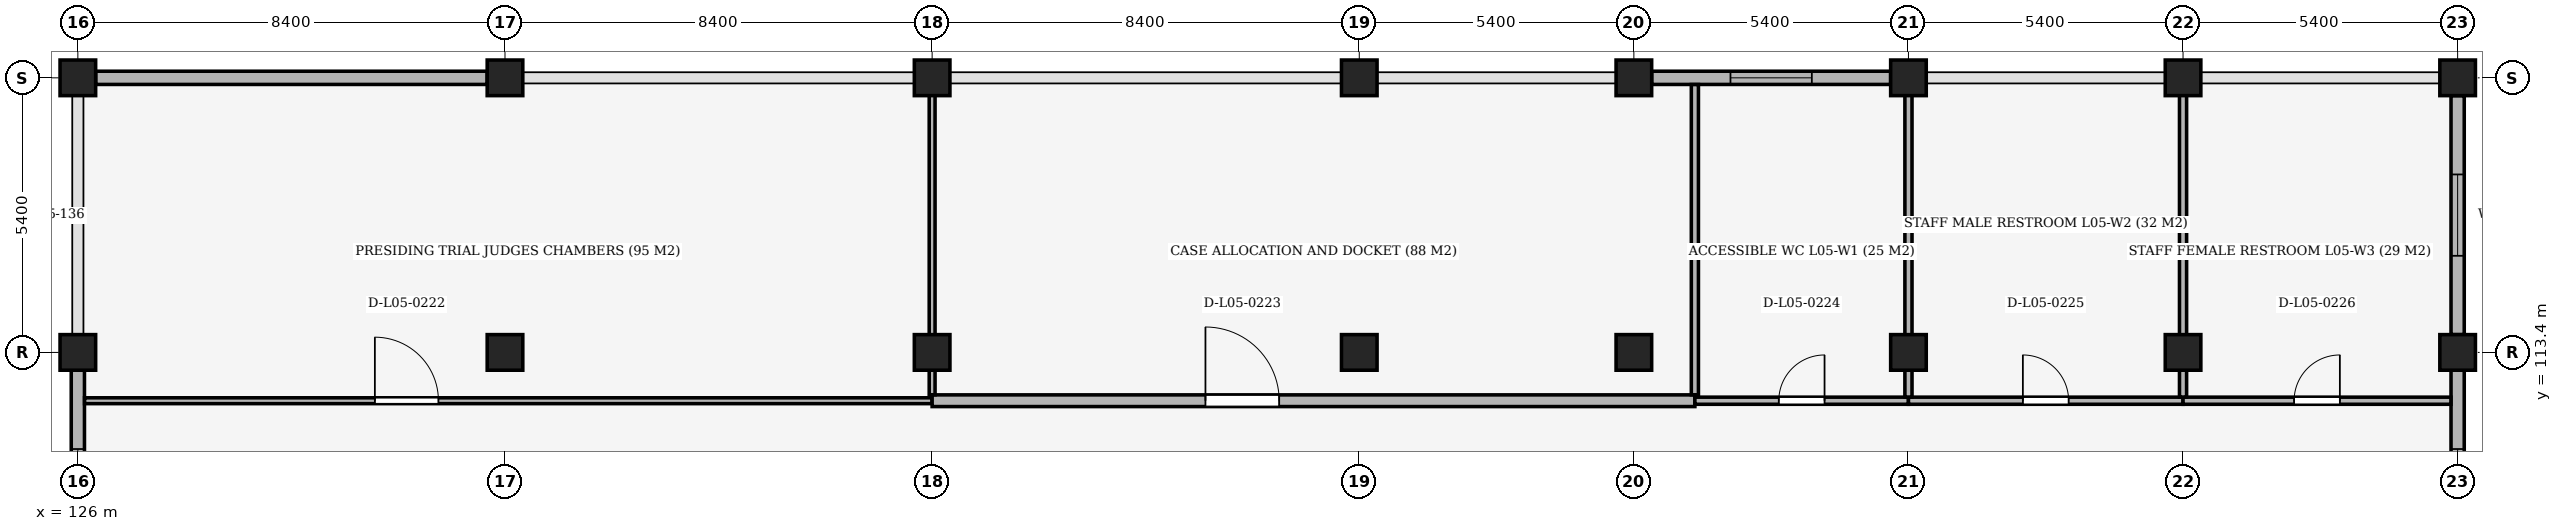
"""IFC4 building model, lengths in metres.
Left out: names, types, materials, properties, quantities, classifications, styles, units other than length and angle.
Written with IfcOpenShell. Run it as: python <this file> out.ifc"""

import sys

from ifc_helpers import new_model, si_unit, direction, frame, frame_2d, origin, origin_2d, place, context, subcontext, project, spatial, rectangle, extrude, element, fill, save


model = new_model("IFC4")
c1 = context("Model", 3, precision=1e-05, world=origin(), true_north=direction((0.0, 1.0)))
c2 = subcontext(c1, "Body", "Model", "MODEL_VIEW")
j1 = project(units=[si_unit("LENGTHUNIT", "METRE"), si_unit("PLANEANGLEUNIT", "RADIAN")], contexts=[c1])
p1 = place(None, origin())
s1 = spatial("IfcSite", under=j1, at=p1, CompositionType="ELEMENT")
p2 = place(p1, origin())
s2 = spatial("IfcBuilding", under=s1, at=p2, CompositionType="ELEMENT")
p3 = place(p2, frame((0.0, 0.0, 25.2)))
s3 = spatial("IfcBuildingStorey", under=s2, at=p3, CompositionType="ELEMENT", Elevation=25.2)
for number, where, z_axis, x_axis in (
    (1, (126.0, 113.4, 0.0), (0.0, 0.0, 1.0), (1.0, 0.0, 0.0)),
    (2, (126.0, 118.8, 0.0), (0.0, 0.0, 1.0), (1.0, 0.0, 0.0)),
    (3, (134.4, 113.4, 0.0), (0.0, 0.0, 1.0), (1.0, 0.0, 0.0)),
    (4, (134.4, 118.8, 0.0), (0.0, 0.0, 1.0), (1.0, 0.0, 0.0)),
    (5, (142.8, 113.4, 0.0), (0.0, 0.0, 1.0), (1.0, 0.0, 0.0)),
    (6, (142.8, 118.8, 0.0), (0.0, 0.0, 1.0), (1.0, 0.0, 0.0)),
    (7, (151.2, 113.4, 0.0), (0.0, 0.0, 1.0), (1.0, 0.0, 0.0)),
    (8, (151.2, 118.8, 0.0), (0.0, 0.0, 1.0), (1.0, 0.0, 0.0)),
    (9, (156.6, 113.4, 0.0), (0.0, 0.0, 1.0), (1.0, 0.0, 0.0)),
    (10, (156.6, 118.8, 0.0), (0.0, 0.0, 1.0), (1.0, 0.0, 0.0)),
    (11, (162.0, 113.4, 0.0), (0.0, 0.0, 1.0), (1.0, 0.0, 0.0)),
    (12, (162.0, 118.8, 0.0), (0.0, 0.0, 1.0), (1.0, 0.0, 0.0)),
    (13, (167.4, 113.4, 0.0), (0.0, 0.0, 1.0), (1.0, 0.0, 0.0)),
    (14, (167.4, 118.8, 0.0), (0.0, 0.0, 1.0), (1.0, 0.0, 0.0)),
    (15, (172.8, 113.4, 0.0), (0.0, 0.0, 1.0), (1.0, 0.0, 0.0)),
    (16, (172.8, 118.8, 0.0), (0.0, 0.0, 1.0), (1.0, 0.0, 0.0)),
):
    element("IfcColumn", number, at=place(p3, frame(where, z_axis=z_axis, x_axis=x_axis)), inside=s3, PredefinedType="COLUMN", context=c2, shape_type="SweptSolid", body=[
        extrude(rectangle(XDim=0.7, YDim=0.7, at=origin_2d()), origin(), (0.0, 0.0, 1.0), 4.2),
    ])
p4 = place(p3, frame((126.0, 108.35, 0.0), z_axis=(0.0, 0.0, 1.0), x_axis=(0.0, 1.0, 0.0)))
e17 = element("IfcWall", 17, at=p4, inside=s3, PredefinedType="SOLIDWALL", context=c2, shape_type="SweptSolid", body=[
    extrude(rectangle(XDim=4.7, YDim=0.26, at=frame_2d((2.35, 0.0))), origin(), (0.0, 0.0, 1.0), 3.4),
])
p5 = place(p4, frame((1.55, 0.0, 1.05)))
e18 = element("IfcOpeningElement", 18, at=p5, cuts=e17, PredefinedType="OPENING", context=c2, shape_type="SweptSolid", body=[
    extrude(rectangle(XDim=1.6, YDim=1.8, at=frame_2d((0.8, 0.9))), frame((0.0, 0.145, 0.0), z_axis=(0.0, -1.0, 0.0), x_axis=(1.0, 0.0, 0.0)), (0.0, 0.0, 1.0), 0.29),
])
p6 = place(p3, frame((126.35, 118.8, 0.0), z_axis=(0.0, 0.0, 1.0), x_axis=(1.0, 0.0, 0.0)))
e19 = element("IfcWall", 19, at=p6, inside=s3, PredefinedType="SOLIDWALL", context=c2, shape_type="SweptSolid", body=[
    extrude(rectangle(XDim=7.7, YDim=0.26, at=frame_2d((3.85, 0.0))), origin(), (0.0, 0.0, 1.0), 3.25),
])
p7 = place(p3, frame((156.95, 118.8, 0.0), z_axis=(0.0, 0.0, 1.0), x_axis=(1.0, 0.0, 0.0)))
e20 = element("IfcWall", 20, at=p7, inside=s3, PredefinedType="SOLIDWALL", context=c2, shape_type="SweptSolid", body=[
    extrude(rectangle(XDim=4.7, YDim=0.26, at=frame_2d((2.35, 0.0))), origin(), (0.0, 0.0, 1.0), 3.35),
])
p8 = place(p7, frame((1.55, 0.0, 1.05)))
e21 = element("IfcOpeningElement", 21, at=p8, cuts=e20, PredefinedType="OPENING", context=c2, shape_type="SweptSolid", body=[
    extrude(rectangle(XDim=1.6, YDim=1.8, at=frame_2d((0.8, 0.9))), frame((0.0, 0.145, 0.0), z_axis=(0.0, -1.0, 0.0), x_axis=(1.0, 0.0, 0.0)), (0.0, 0.0, 1.0), 0.29),
])
p9 = place(p3, frame((172.8, 118.45, 0.0), z_axis=(0.0, 0.0, 1.0), x_axis=(0.0, -1.0, 0.0)))
e22 = element("IfcWall", 22, at=p9, inside=s3, PredefinedType="SOLIDWALL", context=c2, shape_type="SweptSolid", body=[
    extrude(rectangle(XDim=4.7, YDim=0.26, at=frame_2d((2.35, 0.0))), origin(), (0.0, 0.0, 1.0), 3.4),
])
p10 = place(p9, frame((1.55, 0.0, 1.05)))
e23 = element("IfcOpeningElement", 23, at=p10, cuts=e22, PredefinedType="OPENING", context=c2, shape_type="SweptSolid", body=[
    extrude(rectangle(XDim=1.6, YDim=1.8, at=frame_2d((0.8, 0.9))), frame((0.0, 0.145, 0.0), z_axis=(0.0, -1.0, 0.0), x_axis=(1.0, 0.0, 0.0)), (0.0, 0.0, 1.0), 0.29),
])
p11 = place(p3, frame((172.8, 113.05, 0.0), z_axis=(0.0, 0.0, 1.0), x_axis=(0.0, -1.0, 0.0)))
e24 = element("IfcWall", 24, at=p11, inside=s3, PredefinedType="SOLIDWALL", context=c2, shape_type="SweptSolid", body=[
    extrude(rectangle(XDim=4.7, YDim=0.26, at=frame_2d((2.35, 0.0))), origin(), (0.0, 0.0, 1.0), 3.4),
])
p12 = place(p11, frame((1.55, 0.0, 1.05)))
e25 = element("IfcOpeningElement", 25, at=p12, cuts=e24, PredefinedType="OPENING", context=c2, shape_type="SweptSolid", body=[
    extrude(rectangle(XDim=1.6, YDim=1.8, at=frame_2d((0.8, 0.9))), frame((0.0, 0.145, 0.0), z_axis=(0.0, -1.0, 0.0), x_axis=(1.0, 0.0, 0.0)), (0.0, 0.0, 1.0), 0.29),
])
p13 = place(p3, frame((126.132, 112.45, 0.0), z_axis=(0.0, 0.0, 1.0), x_axis=(1.0, 0.0, 0.0)))
e26 = element("IfcWall", 26, at=p13, inside=s3, PredefinedType="PARTITIONING", context=c2, shape_type="SweptSolid", body=[
    extrude(rectangle(XDim=16.668, YDim=0.115, at=frame_2d((8.334, 0.0))), origin(), (0.0, 0.0, 1.0), 3.4),
])
p14 = place(p13, frame((5.709, 0.0, 0.0)))
e27 = element("IfcOpeningElement", 27, at=p14, cuts=e26, PredefinedType="OPENING", context=c2, shape_type="SweptSolid", body=[
    extrude(rectangle(XDim=1.25, YDim=2.2, at=frame_2d((0.625, 1.1))), frame((0.0, 0.072, 0.0), z_axis=(0.0, -1.0, 0.0), x_axis=(1.0, 0.0, 0.0)), (0.0, 0.0, 1.0), 0.145),
])
p15 = place(p3, frame((142.8, 112.45, 0.0), z_axis=(0.0, 0.0, 1.0), x_axis=(1.0, 0.0, 0.0)))
e28 = element("IfcWall", 28, at=p15, inside=s3, PredefinedType="SOLIDWALL", context=c2, shape_type="SweptSolid", body=[
    extrude(rectangle(XDim=15.0, YDim=0.23, at=frame_2d((7.5, 0.0))), origin(), (0.0, 0.0, 1.0), 3.4),
])
p16 = place(p15, frame((5.375, 0.0, 0.0)))
e29 = element("IfcOpeningElement", 29, at=p16, cuts=e28, PredefinedType="OPENING", context=c2, shape_type="SweptSolid", body=[
    extrude(rectangle(XDim=1.45, YDim=2.25, at=frame_2d((0.725, 1.125))), frame((0.0, 0.13, 0.0), z_axis=(0.0, -1.0, 0.0), x_axis=(1.0, 0.0, 0.0)), (0.0, 0.0, 1.0), 0.26),
])
p17 = place(p3, frame((157.8, 112.45, 0.0), z_axis=(0.0, 0.0, 1.0), x_axis=(1.0, 0.0, 0.0)))
e30 = element("IfcWall", 30, at=p17, inside=s3, PredefinedType="PARTITIONING", context=c2, shape_type="SweptSolid", body=[
    extrude(rectangle(XDim=4.2, YDim=0.14, at=frame_2d((2.1, 0.0))), origin(), (0.0, 0.0, 1.0), 3.4),
])
p18 = place(p17, frame((1.65, 0.0, 0.0)))
e31 = element("IfcOpeningElement", 31, at=p18, cuts=e30, PredefinedType="OPENING", context=c2, shape_type="SweptSolid", body=[
    extrude(rectangle(XDim=0.9, YDim=2.1, at=frame_2d((0.45, 1.05))), frame((0.0, 0.085, 0.0), z_axis=(0.0, -1.0, 0.0), x_axis=(1.0, 0.0, 0.0)), (0.0, 0.0, 1.0), 0.17),
])
p19 = place(p3, frame((162.0, 112.45, 0.0), z_axis=(0.0, 0.0, 1.0), x_axis=(1.0, 0.0, 0.0)))
e32 = element("IfcWall", 32, at=p19, inside=s3, PredefinedType="PARTITIONING", context=c2, shape_type="SweptSolid", body=[
    extrude(rectangle(XDim=5.4, YDim=0.14, at=frame_2d((2.7, 0.0))), origin(), (0.0, 0.0, 1.0), 3.4),
])
p20 = place(p19, frame((2.25, 0.0, 0.0)))
e33 = element("IfcOpeningElement", 33, at=p20, cuts=e32, PredefinedType="OPENING", context=c2, shape_type="SweptSolid", body=[
    extrude(rectangle(XDim=0.9, YDim=2.1, at=frame_2d((0.45, 1.05))), frame((0.0, 0.085, 0.0), z_axis=(0.0, -1.0, 0.0), x_axis=(1.0, 0.0, 0.0)), (0.0, 0.0, 1.0), 0.17),
])
p21 = place(p3, frame((167.4, 112.45, 0.0), z_axis=(0.0, 0.0, 1.0), x_axis=(1.0, 0.0, 0.0)))
e34 = element("IfcWall", 34, at=p21, inside=s3, PredefinedType="PARTITIONING", context=c2, shape_type="SweptSolid", body=[
    extrude(rectangle(XDim=5.268, YDim=0.14, at=frame_2d((2.634, 0.0))), origin(), (0.0, 0.0, 1.0), 3.4),
])
p22 = place(p21, frame((2.184, 0.0, 0.0)))
e35 = element("IfcOpeningElement", 35, at=p22, cuts=e34, PredefinedType="OPENING", context=c2, shape_type="SweptSolid", body=[
    extrude(rectangle(XDim=0.9, YDim=2.1, at=frame_2d((0.45, 1.05))), frame((0.0, 0.085, 0.0), z_axis=(0.0, -1.0, 0.0), x_axis=(1.0, 0.0, 0.0)), (0.0, 0.0, 1.0), 0.17),
])
p23 = place(p3, frame((142.8, 112.567, 0.0), z_axis=(0.0, 0.0, 1.0), x_axis=(0.0, 1.0, 0.0)))
e36 = element("IfcWall", 36, at=p23, inside=s3, PredefinedType="PARTITIONING", context=c2, shape_type="SweptSolid", body=[
    extrude(rectangle(XDim=6.238, YDim=0.115, at=frame_2d((3.119, 0.0))), origin(), (0.0, 0.0, 1.0), 3.4),
])
p24 = place(p3, frame((157.8, 112.567, 0.0), z_axis=(0.0, 0.0, 1.0), x_axis=(0.0, 1.0, 0.0)))
e37 = element("IfcWall", 37, at=p24, inside=s3, PredefinedType="PARTITIONING", context=c2, shape_type="SweptSolid", body=[
    extrude(rectangle(XDim=6.101, YDim=0.14, at=frame_2d((3.051, 0.0))), origin(), (0.0, 0.0, 1.0), 3.35),
])
p25 = place(p3, frame((162.0, 112.522, 0.0), z_axis=(0.0, 0.0, 1.0), x_axis=(0.0, 1.0, 0.0)))
e38 = element("IfcWall", 38, at=p25, inside=s3, PredefinedType="PARTITIONING", context=c2, shape_type="SweptSolid", body=[
    extrude(rectangle(XDim=6.263, YDim=0.14, at=frame_2d((3.131, 0.0))), origin(), (0.0, 0.0, 1.0), 3.4),
])
p26 = place(p3, frame((167.4, 112.522, 0.0), z_axis=(0.0, 0.0, 1.0), x_axis=(0.0, 1.0, 0.0)))
e39 = element("IfcWall", 39, at=p26, inside=s3, PredefinedType="PARTITIONING", context=c2, shape_type="SweptSolid", body=[
    extrude(rectangle(XDim=6.283, YDim=0.14, at=frame_2d((3.142, 0.0))), origin(), (0.0, 0.0, 1.0), 3.4),
])
p27 = place(p5, origin())
e40 = element("IfcWindow", 40, at=p27, inside=s3, PartitioningType="SINGLE_PANEL", PredefinedType="WINDOW", context=c2, shape_type="SweptSolid", body=[
    extrude(rectangle(XDim=1.6, YDim=1.8, at=frame_2d((0.8, 0.9))), frame((0.0, 0.03, 0.0), z_axis=(0.0, -1.0, 0.0), x_axis=(1.0, 0.0, 0.0)), (0.0, 0.0, 1.0), 0.06),
])
fill(e18, e40)
p28 = place(p8, origin())
e41 = element("IfcWindow", 41, at=p28, inside=s3, PartitioningType="SINGLE_PANEL", PredefinedType="WINDOW", context=c2, shape_type="SweptSolid", body=[
    extrude(rectangle(XDim=1.6, YDim=1.8, at=frame_2d((0.8, 0.9))), frame((0.0, 0.03, 0.0), z_axis=(0.0, -1.0, 0.0), x_axis=(1.0, 0.0, 0.0)), (0.0, 0.0, 1.0), 0.06),
])
fill(e21, e41)
p29 = place(p10, origin())
e42 = element("IfcWindow", 42, at=p29, inside=s3, PartitioningType="SINGLE_PANEL", PredefinedType="WINDOW", context=c2, shape_type="SweptSolid", body=[
    extrude(rectangle(XDim=1.6, YDim=1.8, at=frame_2d((0.8, 0.9))), frame((0.0, 0.03, 0.0), z_axis=(0.0, -1.0, 0.0), x_axis=(1.0, 0.0, 0.0)), (0.0, 0.0, 1.0), 0.06),
])
fill(e23, e42)
p30 = place(p12, origin())
e43 = element("IfcWindow", 43, at=p30, inside=s3, PartitioningType="SINGLE_PANEL", PredefinedType="WINDOW", context=c2, shape_type="SweptSolid", body=[
    extrude(rectangle(XDim=1.6, YDim=1.8, at=frame_2d((0.8, 0.9))), frame((0.0, 0.03, 0.0), z_axis=(0.0, -1.0, 0.0), x_axis=(1.0, 0.0, 0.0)), (0.0, 0.0, 1.0), 0.06),
])
fill(e25, e43)
p31 = place(p14, origin())
e44 = element("IfcDoor", 44, at=p31, inside=s3, OperationType="SINGLE_SWING_LEFT", PredefinedType="DOOR", context=c2, shape_type="SweptSolid", body=[
    extrude(rectangle(XDim=1.25, YDim=2.2, at=frame_2d((0.625, 1.1))), frame((0.0, 0.025, 0.0), z_axis=(0.0, -1.0, 0.0), x_axis=(1.0, 0.0, 0.0)), (0.0, 0.0, 1.0), 0.05),
])
fill(e27, e44)
p32 = place(p16, origin())
e45 = element("IfcDoor", 45, at=p32, inside=s3, OperationType="SINGLE_SWING_LEFT", PredefinedType="DOOR", context=c2, shape_type="SweptSolid", body=[
    extrude(rectangle(XDim=1.45, YDim=2.25, at=frame_2d((0.725, 1.125))), frame((0.0, 0.025, 0.0), z_axis=(0.0, -1.0, 0.0), x_axis=(1.0, 0.0, 0.0)), (0.0, 0.0, 1.0), 0.05),
])
fill(e29, e45)
p33 = place(p18, origin())
e46 = element("IfcDoor", 46, at=p33, inside=s3, OperationType="SINGLE_SWING_RIGHT", PredefinedType="DOOR", context=c2, shape_type="SweptSolid", body=[
    extrude(rectangle(XDim=0.9, YDim=2.1, at=frame_2d((0.45, 1.05))), frame((0.0, 0.025, 0.0), z_axis=(0.0, -1.0, 0.0), x_axis=(1.0, 0.0, 0.0)), (0.0, 0.0, 1.0), 0.05),
])
fill(e31, e46)
p34 = place(p20, origin())
e47 = element("IfcDoor", 47, at=p34, inside=s3, OperationType="SINGLE_SWING_LEFT", PredefinedType="DOOR", context=c2, shape_type="SweptSolid", body=[
    extrude(rectangle(XDim=0.9, YDim=2.1, at=frame_2d((0.45, 1.05))), frame((0.0, 0.025, 0.0), z_axis=(0.0, -1.0, 0.0), x_axis=(1.0, 0.0, 0.0)), (0.0, 0.0, 1.0), 0.05),
])
fill(e33, e47)
p35 = place(p22, origin())
e48 = element("IfcDoor", 48, at=p35, inside=s3, OperationType="SINGLE_SWING_RIGHT", PredefinedType="DOOR", context=c2, shape_type="SweptSolid", body=[
    extrude(rectangle(XDim=0.9, YDim=2.1, at=frame_2d((0.45, 1.05))), frame((0.0, 0.025, 0.0), z_axis=(0.0, -1.0, 0.0), x_axis=(1.0, 0.0, 0.0)), (0.0, 0.0, 1.0), 0.05),
])
fill(e35, e48)
save(model, sys.argv[1])
